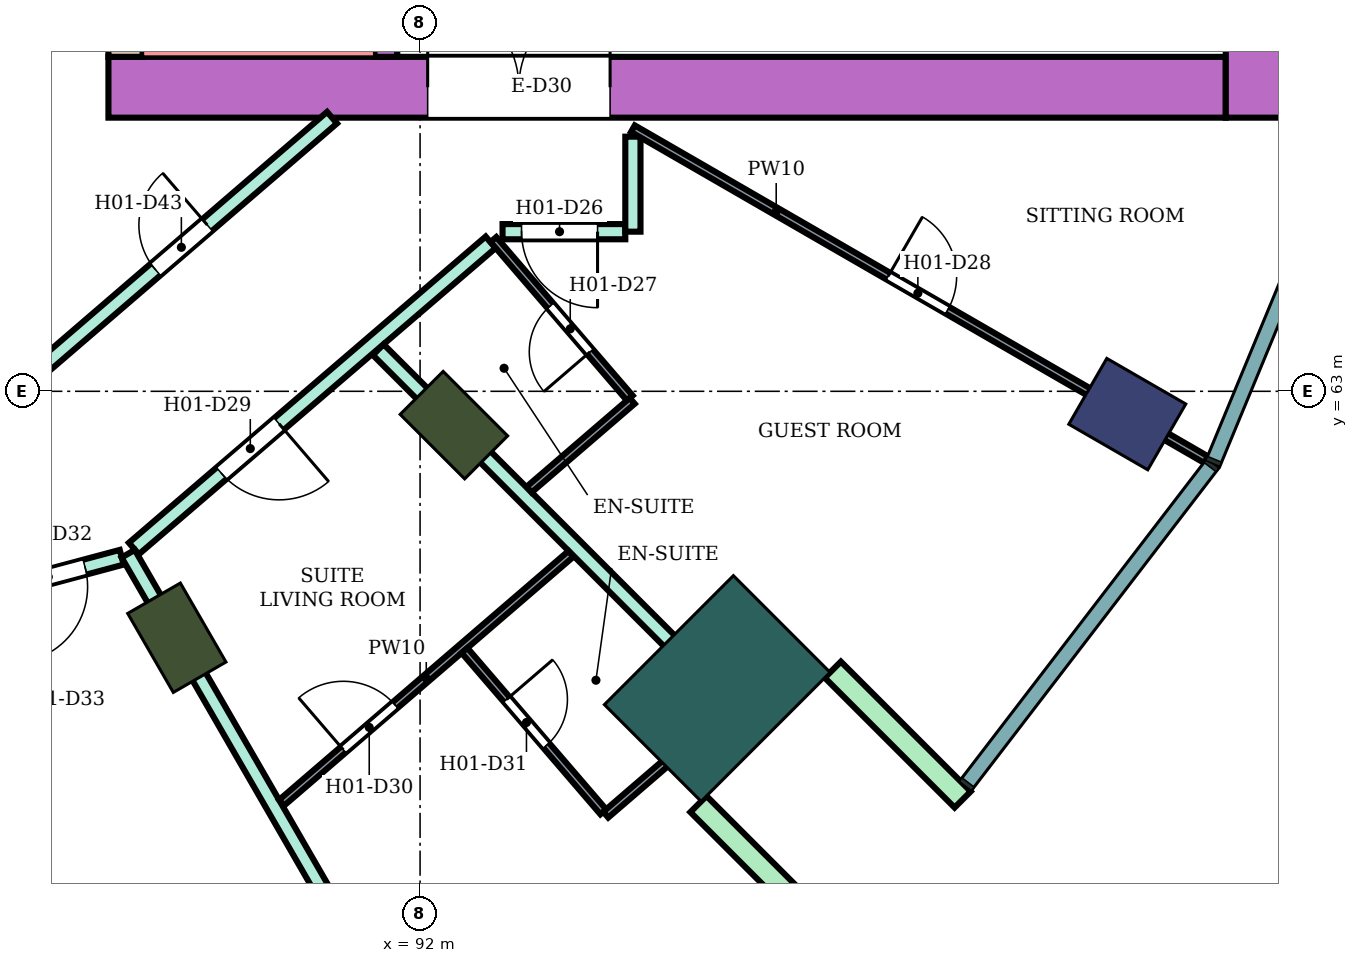
"""IFC4 building model, lengths in metres.
Left out: names, types, materials, properties, quantities, classifications, styles, units other than length and angle.
Written with IfcOpenShell. Run it as: python <this file> out.ifc"""

import sys

from ifc_helpers import new_model, si_unit, direction, frame, frame_2d, origin, origin_2d, place, context, subcontext, project, spatial, rectangle, extrude, element, fill, save


model = new_model("IFC4")
c1 = context("Model", 3, precision=1e-05, world=origin(), true_north=direction((0.0, 1.0)))
c2 = subcontext(c1, "Body", "Model", "MODEL_VIEW")
j1 = project(units=[si_unit("LENGTHUNIT", "METRE"), si_unit("PLANEANGLEUNIT", "RADIAN")], contexts=[c1])
p1 = place(None, origin())
s1 = spatial("IfcSite", under=j1, at=p1, CompositionType="ELEMENT")
p2 = place(p1, origin())
s2 = spatial("IfcBuilding", under=s1, at=p2, CompositionType="ELEMENT")
p3 = place(p2, frame((0.0, 0.0, 36.4)))
s3 = spatial("IfcBuildingStorey", under=s2, at=p3, CompositionType="ELEMENT", Elevation=36.4)
p4 = place(p3, frame((101.304, 62.7, 0.0), z_axis=(0.0, 0.0, 1.0), x_axis=(0.866025403784, -0.5, 0.0)))
e1 = element("IfcColumn", 1, at=p4, inside=s3, PredefinedType="COLUMN", context=c2, shape_type="SweptSolid", body=[
    extrude(rectangle(XDim=1.2, YDim=1.0, at=origin_2d()), origin(), (0.0, 0.0, 1.0), 3.8),
])
for number, where, z_axis, x_axis in (
    (2, (88.8, 59.758, 0.0), (0.0, 0.0, 1.0), (0.5, -0.866, 0.0)),
    (3, (92.445, 62.555, 0.0), (0.0, 0.0, 1.0), (0.707, -0.707, 0.0)),
):
    element("IfcColumn", number, at=place(p3, frame(where, z_axis=z_axis, x_axis=x_axis)), inside=s3, PredefinedType="COLUMN", context=c2, shape_type="SweptSolid", body=[
        extrude(rectangle(XDim=1.2, YDim=0.8, at=origin_2d()), origin(), (0.0, 0.0, 1.0), 3.8),
    ])
p5 = place(p3, frame((95.91, 59.09, 0.0), z_axis=(0.0, 0.0, 1.0), x_axis=(0.707106781187, -0.707106781187, 0.0)))
e4 = element("IfcColumn", 4, at=p5, inside=s3, PredefinedType="COLUMN", context=c2, shape_type="SweptSolid", body=[
    extrude(rectangle(XDim=1.8, YDim=2.4, at=origin_2d()), origin(), (0.0, 0.0, 1.0), 3.8),
])
p6 = place(p3, frame((87.9, 67.0, 0.0), z_axis=(0.0, 0.0, 1.0), x_axis=(1.0, 0.0, 0.0)))
e5 = element("IfcWall", 5, at=p6, inside=s3, PredefinedType="SHEAR", context=c2, shape_type="SweptSolid", body=[
    extrude(rectangle(XDim=14.7, YDim=0.8, at=frame_2d((7.35, 0.0))), origin(), (0.0, 0.0, 1.0), 3.48),
])
p7 = place(p6, frame((4.2, 0.0, 0.0)))
e6 = element("IfcOpeningElement", 6, at=p7, cuts=e5, PredefinedType="OPENING", context=c2, shape_type="SweptSolid", body=[
    extrude(rectangle(XDim=2.4, YDim=2.4, at=frame_2d((1.2, 1.2))), frame((0.0, 0.41, 0.0), z_axis=(0.0, -1.0, 0.0), x_axis=(1.0, 0.0, 0.0)), (0.0, 0.0, 1.0), 0.82),
])
p8 = place(p3, frame((88.125, 67.4, 0.0), z_axis=(0.0, 0.0, 1.0), x_axis=(0.0, 1.0, 0.0)))
e7 = element("IfcWall", 7, at=p8, inside=s3, PredefinedType="SHEAR", context=c2, shape_type="SweptSolid", body=[
    extrude(rectangle(XDim=7.6, YDim=0.45, at=frame_2d((3.8, 0.0))), origin(), (0.0, 0.0, 1.0), 3.48),
])
p9 = place(p3, frame((103.0, 66.6, 0.0), z_axis=(0.0, 0.0, 1.0), x_axis=(0.0, 1.0, 0.0)))
e8 = element("IfcWall", 8, at=p9, inside=s3, PredefinedType="SHEAR", context=c2, shape_type="SweptSolid", body=[
    extrude(rectangle(XDim=16.8, YDim=0.8, at=frame_2d((8.4, 0.0))), origin(), (0.0, 0.0, 1.0), 3.48),
])
p10 = place(p3, frame((91.55, 67.4, 0.0), z_axis=(0.0, 0.0, 1.0), x_axis=(0.0, 1.0, 0.0)))
e9 = element("IfcWall", 9, at=p10, inside=s3, PredefinedType="SHEAR", context=c2, shape_type="SweptSolid", body=[
    extrude(rectangle(XDim=7.6, YDim=0.3, at=frame_2d((3.8, 0.0))), origin(), (0.0, 0.0, 1.0), 3.48),
])
p11 = place(p10, frame((0.25, 0.0, 0.0)))
e10 = element("IfcOpeningElement", 10, at=p11, cuts=e9, PredefinedType="OPENING", context=c2, shape_type="SweptSolid", body=[
    extrude(rectangle(XDim=0.9, YDim=2.1, at=frame_2d((0.45, 1.05))), frame((0.0, 0.16, 0.0), z_axis=(0.0, -1.0, 0.0), x_axis=(1.0, 0.0, 0.0)), (0.0, 0.0, 1.0), 0.32),
])
for number, where, z_axis, x_axis in (
    (11, (95.662, 57.57, 0.0), (0.0, 0.0, 1.0), (0.707, -0.707, 0.0)),
    (12, (97.43, 59.338, 0.0), (0.0, 0.0, 1.0), (0.707, -0.707, 0.0)),
):
    element("IfcWall", number, at=place(p3, frame(where, z_axis=z_axis, x_axis=x_axis)), inside=s3, PredefinedType="NOTDEFINED", context=c2, shape_type="SweptSolid", body=[
        extrude(rectangle(XDim=2.416, YDim=0.3, at=frame_2d((1.208, 0.0))), origin(), (0.0, 0.0, 1.0), 3.8),
    ])
p12 = place(p3, frame((80.0, 58.655, 0.0), z_axis=(0.0, 0.0, 1.0), x_axis=(0.965974635626, 0.258636817424, 0.0)))
e13 = element("IfcWall", 13, at=p12, inside=s3, PredefinedType="PARTITIONING", context=c2, shape_type="SweptSolid", body=[
    extrude(rectangle(XDim=8.36, YDim=0.2, at=frame_2d((4.18, 0.0))), origin(), (0.0, 0.0, 1.0), 3.35),
])
p13 = place(p12, frame((6.86, 0.0, 0.0)))
e14 = element("IfcOpeningElement", 14, at=p13, cuts=e13, PredefinedType="OPENING", context=c2, shape_type="SweptSolid", body=[
    extrude(rectangle(XDim=1.0, YDim=2.1, at=frame_2d((0.5, 1.05))), frame((0.0, 0.11, 0.0), z_axis=(0.0, -1.0, 0.0), x_axis=(1.0, 0.0, 0.0)), (0.0, 0.0, 1.0), 0.22),
])
p14 = place(p12, frame((0.55, 0.0, 0.0)))
e15 = element("IfcOpeningElement", 15, at=p14, cuts=e13, PredefinedType="OPENING", context=c2, shape_type="SweptSolid", body=[
    extrude(rectangle(XDim=1.0, YDim=2.1, at=frame_2d((0.5, 1.05))), frame((0.0, 0.11, 0.0), z_axis=(0.0, -1.0, 0.0), x_axis=(1.0, 0.0, 0.0)), (0.0, 0.0, 1.0), 0.22),
])
p15 = place(p3, frame((86.877, 63.189, 0.0), z_axis=(0.0, 0.0, 1.0), x_axis=(0.758075808328, 0.652166442581, 0.0)))
e16 = element("IfcWall", 16, at=p15, inside=s3, PredefinedType="PARTITIONING", context=c2, shape_type="SweptSolid", body=[
    extrude(rectangle(XDim=5.23, YDim=0.2, at=frame_2d((2.615, 0.0))), origin(), (0.0, 0.0, 1.0), 3.35),
])
p16 = place(p15, frame((2.165, 0.0, 0.0)))
e17 = element("IfcOpeningElement", 17, at=p16, cuts=e16, PredefinedType="OPENING", context=c2, shape_type="SweptSolid", body=[
    extrude(rectangle(XDim=0.9, YDim=2.1, at=frame_2d((0.45, 1.05))), frame((0.0, 0.11, 0.0), z_axis=(0.0, -1.0, 0.0), x_axis=(1.0, 0.0, 0.0)), (0.0, 0.0, 1.0), 0.22),
])
p17 = place(p3, frame((88.235, 60.931, 0.0), z_axis=(0.0, 0.0, 1.0), x_axis=(0.758799498714, 0.651324282329, 0.0)))
e18 = element("IfcWall", 18, at=p17, inside=s3, PredefinedType="PARTITIONING", context=c2, shape_type="SweptSolid", body=[
    extrude(rectangle(XDim=6.186, YDim=0.2, at=frame_2d((3.093, 0.0))), origin(), (0.0, 0.0, 1.0), 3.35),
])
p18 = place(p17, frame((1.519, 0.0, 0.0)))
e19 = element("IfcOpeningElement", 19, at=p18, cuts=e18, PredefinedType="OPENING", context=c2, shape_type="SweptSolid", body=[
    extrude(rectangle(XDim=1.0, YDim=2.1, at=frame_2d((0.5, 1.05))), frame((0.0, 0.11, 0.0), z_axis=(0.0, -1.0, 0.0), x_axis=(1.0, 0.0, 0.0)), (0.0, 0.0, 1.0), 0.22),
])
p19 = place(p3, frame((88.16, 60.863, 0.0), z_axis=(0.0, 0.0, 1.0), x_axis=(0.499946996988, -0.866056002925, 0.0)))
e20 = element("IfcWall", 20, at=p19, inside=s3, PredefinedType="PARTITIONING", context=c2, shape_type="SweptSolid", body=[
    extrude(rectangle(XDim=9.475, YDim=0.2, at=frame_2d((4.737, 0.0))), origin(), (0.0, 0.0, 1.0), 3.35),
])
p20 = place(p3, frame((91.449, 63.548, 0.0), z_axis=(0.0, 0.0, 1.0), x_axis=(0.706984804638, -0.707228736698, 0.0)))
e21 = element("IfcWall", 21, at=p20, inside=s3, PredefinedType="PARTITIONING", context=c2, shape_type="SweptSolid", body=[
    extrude(rectangle(XDim=7.006, YDim=0.2, at=frame_2d((3.503, 0.0))), origin(), (0.0, 0.0, 1.0), 3.35),
])
p21 = place(p3, frame((93.085, 65.1, 0.0), z_axis=(0.0, 0.0, 1.0), x_axis=(1.0, 0.0, 0.0)))
e22 = element("IfcWall", 22, at=p21, inside=s3, PredefinedType="PARTITIONING", context=c2, shape_type="SweptSolid", body=[
    extrude(rectangle(XDim=1.615, YDim=0.2, at=frame_2d((0.808, 0.0))), origin(), (0.0, 0.0, 1.0), 3.35),
])
p22 = place(p21, frame((0.25, 0.0, 0.0)))
e23 = element("IfcOpeningElement", 23, at=p22, cuts=e22, PredefinedType="OPENING", context=c2, shape_type="SweptSolid", body=[
    extrude(rectangle(XDim=1.0, YDim=2.1, at=frame_2d((0.5, 1.05))), frame((0.0, 0.11, 0.0), z_axis=(0.0, -1.0, 0.0), x_axis=(1.0, 0.0, 0.0)), (0.0, 0.0, 1.0), 0.22),
])
p23 = place(p3, frame((94.8, 65.1, 0.0), z_axis=(0.0, 0.0, 1.0), x_axis=(0.0, 1.0, 0.0)))
e24 = element("IfcWall", 24, at=p23, inside=s3, PredefinedType="PARTITIONING", context=c2, shape_type="SweptSolid", body=[
    extrude(rectangle(XDim=1.25, YDim=0.2, at=frame_2d((0.625, 0.0))), origin(), (0.0, 0.0, 1.0), 3.35),
])
p24 = place(p3, frame((90.178, 57.587, 0.0), z_axis=(0.0, 0.0, 1.0), x_axis=(0.758140003227, 0.652091815243, 0.0)))
e25 = element("IfcWall", 25, at=p24, inside=s3, PredefinedType="PARTITIONING", context=c2, shape_type="SweptSolid", body=[
    extrude(rectangle(XDim=5.021, YDim=0.1, at=frame_2d((2.51, 0.0))), origin(), (0.0, 0.0, 1.0), 3.35),
])
p25 = place(p24, frame((1.071, 0.0, 0.0)))
e26 = element("IfcOpeningElement", 26, at=p25, cuts=e25, PredefinedType="OPENING", context=c2, shape_type="SweptSolid", body=[
    extrude(rectangle(XDim=0.9, YDim=2.1, at=frame_2d((0.45, 1.05))), frame((0.0, 0.06, 0.0), z_axis=(0.0, -1.0, 0.0), x_axis=(1.0, 0.0, 0.0)), (0.0, 0.0, 1.0), 0.12),
])
p26 = place(p3, frame((92.585, 59.591, 0.0), z_axis=(0.0, 0.0, 1.0), x_axis=(0.652011200591, -0.758209334092, 0.0)))
e27 = element("IfcWall", 27, at=p26, inside=s3, PredefinedType="PARTITIONING", context=c2, shape_type="SweptSolid", body=[
    extrude(rectangle(XDim=2.8, YDim=0.1, at=frame_2d((1.4, 0.0))), origin(), (0.0, 0.0, 1.0), 3.35),
])
p27 = place(p26, frame((0.85, 0.0, 0.0)))
e28 = element("IfcOpeningElement", 28, at=p27, cuts=e27, PredefinedType="OPENING", context=c2, shape_type="SweptSolid", body=[
    extrude(rectangle(XDim=0.8, YDim=2.1, at=frame_2d((0.4, 1.05))), frame((0.0, 0.06, 0.0), z_axis=(0.0, -1.0, 0.0), x_axis=(1.0, 0.0, 0.0)), (0.0, 0.0, 1.0), 0.12),
])
p28 = place(p3, frame((92.965, 64.997, 0.0), z_axis=(0.0, 0.0, 1.0), x_axis=(0.652069888227, -0.758158862553, 0.0)))
e29 = element("IfcWall", 29, at=p28, inside=s3, PredefinedType="PARTITIONING", context=c2, shape_type="SweptSolid", body=[
    extrude(rectangle(XDim=2.75, YDim=0.1, at=frame_2d((1.375, 0.0))), origin(), (0.0, 0.0, 1.0), 3.35),
])
p29 = place(p28, frame((1.15, 0.0, 0.0)))
e30 = element("IfcOpeningElement", 30, at=p29, cuts=e29, PredefinedType="OPENING", context=c2, shape_type="SweptSolid", body=[
    extrude(rectangle(XDim=0.8, YDim=2.1, at=frame_2d((0.4, 1.05))), frame((0.0, 0.06, 0.0), z_axis=(0.0, -1.0, 0.0), x_axis=(1.0, 0.0, 0.0)), (0.0, 0.0, 1.0), 0.12),
])
p30 = place(p3, frame((93.435, 61.707, 0.0), z_axis=(0.0, 0.0, 1.0), x_axis=(0.758070495124, 0.652172618578, 0.0)))
e31 = element("IfcWall", 31, at=p30, inside=s3, PredefinedType="PARTITIONING", context=c2, shape_type="SweptSolid", body=[
    extrude(rectangle(XDim=1.789, YDim=0.1, at=frame_2d((0.895, 0.0))), origin(), (0.0, 0.0, 1.0), 3.35),
])
p31 = place(p3, frame((94.443, 57.43, 0.0), z_axis=(0.0, 0.0, 1.0), x_axis=(0.757840386328, 0.65243999636, 0.0)))
e32 = element("IfcWall", 32, at=p31, inside=s3, PredefinedType="PARTITIONING", context=c2, shape_type="SweptSolid", body=[
    extrude(rectangle(XDim=2.108, YDim=0.1, at=frame_2d((1.054, 0.0))), origin(), (0.0, 0.0, 1.0), 3.35),
])
p32 = place(p3, frame((94.8, 66.455, 0.0), z_axis=(0.0, 0.0, 1.0), x_axis=(0.86602264145, -0.500004784474, 0.0)))
e33 = element("IfcWall", 33, at=p32, inside=s3, PredefinedType="PARTITIONING", context=c2, shape_type="SweptSolid", body=[
    extrude(rectangle(XDim=8.708, YDim=0.1, at=frame_2d((4.354, 0.0))), origin(), (0.0, 0.0, 1.0), 3.35),
])
p33 = place(p32, frame((3.879, 0.0, 0.0)))
e34 = element("IfcOpeningElement", 34, at=p33, cuts=e33, PredefinedType="OPENING", context=c2, shape_type="SweptSolid", body=[
    extrude(rectangle(XDim=0.9, YDim=2.1, at=frame_2d((0.45, 1.05))), frame((0.0, 0.06, 0.0), z_axis=(0.0, -1.0, 0.0), x_axis=(1.0, 0.0, 0.0)), (0.0, 0.0, 1.0), 0.12),
])
p34 = place(p22, frame((1.0, 0.0, 0.0), z_axis=(0.0, 0.0, 1.0), x_axis=(-1.0, 0.0, 0.0)))
e35 = element("IfcDoor", 35, at=p34, inside=s3, OperationType="SINGLE_SWING_LEFT", PredefinedType="DOOR", context=c2, shape_type="SweptSolid", body=[
    extrude(rectangle(XDim=1.0, YDim=2.1, at=frame_2d((0.5, 1.05))), frame((0.0, 0.025, 0.0), z_axis=(0.0, -1.0, 0.0), x_axis=(1.0, 0.0, 0.0)), (0.0, 0.0, 1.0), 0.05),
])
fill(e23, e35)
p35 = place(p29, frame((0.8, 0.0, 0.0), z_axis=(0.0, 0.0, 1.0), x_axis=(-1.0, 0.0, 0.0)))
e36 = element("IfcDoor", 36, at=p35, inside=s3, OperationType="SINGLE_SWING_LEFT", PredefinedType="DOOR", context=c2, shape_type="SweptSolid", body=[
    extrude(rectangle(XDim=0.8, YDim=2.1, at=frame_2d((0.4, 1.05))), frame((0.0, 0.025, 0.0), z_axis=(0.0, -1.0, 0.0), x_axis=(1.0, 0.0, 0.0)), (0.0, 0.0, 1.0), 0.05),
])
fill(e30, e36)
p36 = place(p33, origin())
e37 = element("IfcDoor", 37, at=p36, inside=s3, OperationType="SINGLE_SWING_LEFT", PredefinedType="DOOR", context=c2, shape_type="SweptSolid", body=[
    extrude(rectangle(XDim=0.9, YDim=2.1, at=frame_2d((0.45, 1.05))), frame((0.0, 0.025, 0.0), z_axis=(0.0, -1.0, 0.0), x_axis=(1.0, 0.0, 0.0)), (0.0, 0.0, 1.0), 0.05),
])
fill(e34, e37)
p37 = place(p18, frame((1.0, 0.0, 0.0), z_axis=(0.0, 0.0, 1.0), x_axis=(-1.0, 0.0, 0.0)))
e38 = element("IfcDoor", 38, at=p37, inside=s3, OperationType="SINGLE_SWING_LEFT", PredefinedType="DOOR", context=c2, shape_type="SweptSolid", body=[
    extrude(rectangle(XDim=1.0, YDim=2.1, at=frame_2d((0.5, 1.05))), frame((0.0, 0.025, 0.0), z_axis=(0.0, -1.0, 0.0), x_axis=(1.0, 0.0, 0.0)), (0.0, 0.0, 1.0), 0.05),
])
fill(e19, e38)
p38 = place(p25, origin())
e39 = element("IfcDoor", 39, at=p38, inside=s3, OperationType="SINGLE_SWING_LEFT", PredefinedType="DOOR", context=c2, shape_type="SweptSolid", body=[
    extrude(rectangle(XDim=0.9, YDim=2.1, at=frame_2d((0.45, 1.05))), frame((0.0, 0.025, 0.0), z_axis=(0.0, -1.0, 0.0), x_axis=(1.0, 0.0, 0.0)), (0.0, 0.0, 1.0), 0.05),
])
fill(e26, e39)
p39 = place(p27, origin())
e40 = element("IfcDoor", 40, at=p39, inside=s3, OperationType="SINGLE_SWING_LEFT", PredefinedType="DOOR", context=c2, shape_type="SweptSolid", body=[
    extrude(rectangle(XDim=0.8, YDim=2.1, at=frame_2d((0.4, 1.05))), frame((0.0, 0.025, 0.0), z_axis=(0.0, -1.0, 0.0), x_axis=(1.0, 0.0, 0.0)), (0.0, 0.0, 1.0), 0.05),
])
fill(e28, e40)
p40 = place(p13, frame((1.0, 0.0, 0.0), z_axis=(0.0, 0.0, 1.0), x_axis=(-1.0, 0.0, 0.0)))
e41 = element("IfcDoor", 41, at=p40, inside=s3, OperationType="SINGLE_SWING_RIGHT", PredefinedType="DOOR", context=c2, shape_type="SweptSolid", body=[
    extrude(rectangle(XDim=1.0, YDim=2.1, at=frame_2d((0.5, 1.05))), frame((0.0, 0.025, 0.0), z_axis=(0.0, -1.0, 0.0), x_axis=(1.0, 0.0, 0.0)), (0.0, 0.0, 1.0), 0.05),
])
fill(e14, e41)
p41 = place(p16, origin())
e42 = element("IfcDoor", 42, at=p41, inside=s3, OperationType="SINGLE_SWING_RIGHT", PredefinedType="DOOR", context=c2, shape_type="SweptSolid", body=[
    extrude(rectangle(XDim=0.9, YDim=2.1, at=frame_2d((0.45, 1.05))), frame((0.0, 0.025, 0.0), z_axis=(0.0, -1.0, 0.0), x_axis=(1.0, 0.0, 0.0)), (0.0, 0.0, 1.0), 0.05),
])
fill(e17, e42)
p42 = place(p7, origin())
e43 = element("IfcDoor", 43, at=p42, inside=s3, OperationType="DOUBLE_DOOR_SINGLE_SWING", PredefinedType="DOOR", context=c2, shape_type="SweptSolid", body=[
    extrude(rectangle(XDim=2.4, YDim=2.4, at=frame_2d((1.2, 1.2))), frame((0.0, 0.025, 0.0), z_axis=(0.0, -1.0, 0.0), x_axis=(1.0, 0.0, 0.0)), (0.0, 0.0, 1.0), 0.05),
])
fill(e6, e43)
save(model, sys.argv[1])
